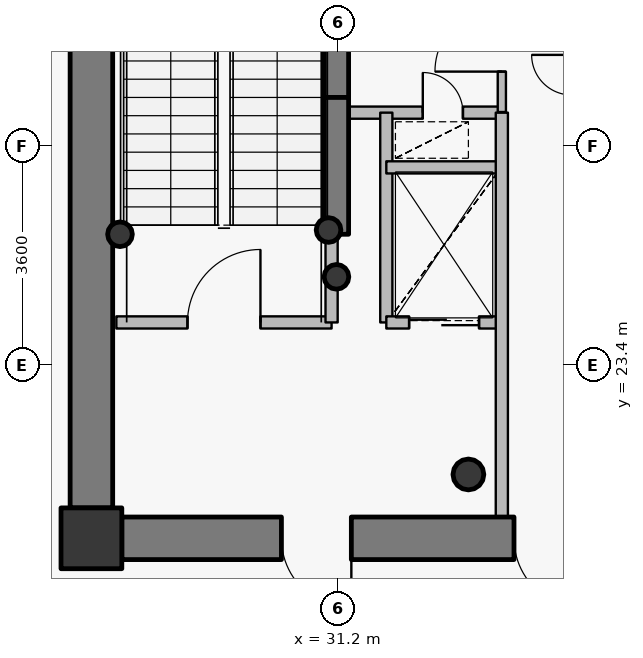
"""IFC4 building model, lengths in metres.
Left out: names, types, materials, properties, quantities, classifications, styles, units other than length and angle.
Written with IfcOpenShell. Run it as: python <this file> out.ifc"""

import sys

from ifc_helpers import new_model, si_unit, direction, frame, frame_2d, origin, origin_2d, place, context, subcontext, project, spatial, rectangle, hollow_circle, extrude, source, transform, mapped, element, fill, save


model = new_model("IFC4")
c1 = context("Model", 3, precision=1e-05, world=origin(), true_north=direction((0.0, 1.0)))
c2 = subcontext(c1, "Body", "Model", "MODEL_VIEW")
j1 = project(units=[si_unit("LENGTHUNIT", "METRE"), si_unit("PLANEANGLEUNIT", "RADIAN")], contexts=[c1])
p1 = place(None, origin())
s1 = spatial("IfcSite", under=j1, at=p1, CompositionType="ELEMENT")
p2 = place(p1, origin())
s2 = spatial("IfcBuilding", under=s1, at=p2, CompositionType="ELEMENT")
p3 = place(p2, frame((0.0, 0.0, 284.25)))
s3 = spatial("IfcBuildingStorey", under=s2, at=p3, CompositionType="ELEMENT", Elevation=284.25)
p4 = place(p3, frame((27.15, 20.55, 0.0), z_axis=(0.0, 0.0, 1.0), x_axis=(1.0, 0.0, 0.0)))
e1 = element("IfcColumn", 1, at=p4, inside=s3, PredefinedType="COLUMN", context=c2, shape_type="SweptSolid", body=[
    extrude(rectangle(XDim=1.0, YDim=1.0, at=origin_2d()), origin(), (0.0, 0.0, 1.0), 3.75),
])
p5 = place(p3, frame((33.35, 21.6, 0.0), z_axis=(0.0, 0.0, 1.0), x_axis=(1.0, 0.0, 0.0)))
e2 = element("IfcColumn", 2, at=p5, inside=s3, PredefinedType="COLUMN", context=c2, shape_type="SweptSolid", body=[
    extrude(hollow_circle(Radius=0.254, WallThickness=0.02, at=origin_2d()), origin(), (0.0, 0.0, 1.0), 3.75),
])
p6 = place(p3, frame((31.18, 27.8, 0.0), z_axis=(0.0, 0.0, 1.0), x_axis=(0.0, 1.0, 0.0)))
e3 = element("IfcWall", 3, at=p6, inside=s3, PredefinedType="SHEAR", context=c2, shape_type="SweptSolid", body=[
    extrude(rectangle(XDim=4.75, YDim=0.4, at=frame_2d((2.375, 0.0))), origin(), (0.0, 0.0, 1.0), 3.75),
])
for number, where, z_axis, x_axis in (
    (4, (31.05, 25.62, 0.0), (0.0, 0.0, 1.0), (1.0, 0.0, 0.0)),
    (5, (31.18, 24.85, 0.0), (0.0, 0.0, 1.0), (1.0, 0.0, 0.0)),
    (6, (27.62, 25.55, 0.0), (0.0, 0.0, 1.0), (1.0, 0.0, 0.0)),
):
    element("IfcColumn", number, at=place(p3, frame(where, z_axis=z_axis, x_axis=x_axis)), inside=s3, PredefinedType="COLUMN", context=c2, shape_type="SweptSolid", body=[
        extrude(hollow_circle(Radius=0.203, WallThickness=0.016, at=origin_2d()), origin(), (0.0, 0.0, 1.0), 3.75),
    ])
p7 = place(p3, frame((44.35, 20.55, 0.0), z_axis=(0.0, 0.0, 1.0), x_axis=(-1.0, 0.0, 0.0)))
e7 = element("IfcWall", 7, at=p7, inside=s3, PredefinedType="SHEAR", context=c2, shape_type="SweptSolid", body=[
    extrude(rectangle(XDim=16.7, YDim=0.7, at=frame_2d((8.35, 0.0))), origin(), (0.0, 0.0, 1.0), 3.05),
])
p8 = place(p7, frame((12.925, 0.0, 0.0)))
e8 = element("IfcOpeningElement", 8, at=p8, cuts=e7, PredefinedType="OPENING", context=c2, shape_type="SweptSolid", body=[
    extrude(rectangle(XDim=1.15, YDim=2.15, at=origin_2d()), frame((0.575, 0.36, 1.075), z_axis=(0.0, -1.0, 0.0), x_axis=(1.0, 0.0, 0.0)), (0.0, 0.0, 1.0), 0.72),
])
p9 = place(p7, frame((9.1, 0.0, 0.0)))
e9 = element("IfcOpeningElement", 9, at=p9, cuts=e7, PredefinedType="OPENING", context=c2, shape_type="SweptSolid", body=[
    extrude(rectangle(XDim=1.15, YDim=2.15, at=origin_2d()), frame((0.575, 0.36, 1.075), z_axis=(0.0, -1.0, 0.0), x_axis=(1.0, 0.0, 0.0)), (0.0, 0.0, 1.0), 0.72),
])
p10 = place(p3, frame((27.15, 21.05, 0.0), z_axis=(0.0, 0.0, 1.0), x_axis=(0.0, 1.0, 0.0)))
e10 = element("IfcWall", 10, at=p10, inside=s3, PredefinedType="SHEAR", context=c2, shape_type="SweptSolid", body=[
    extrude(rectangle(XDim=11.9, YDim=0.7, at=frame_2d((5.95, 0.0))), origin(), (0.0, 0.0, 1.0), 3.05),
])
p11 = place(p3, frame((31.18, 25.55, 0.0), z_axis=(0.0, 0.0, 1.0), x_axis=(0.0, 1.0, 0.0)))
e11 = element("IfcWall", 11, at=p11, inside=s3, PredefinedType="SHEAR", context=c2, shape_type="SweptSolid", body=[
    extrude(rectangle(XDim=2.25, YDim=0.4, at=frame_2d((1.125, 0.0))), origin(), (0.0, 0.0, 1.0), 3.1),
])
p12 = place(p3, frame((27.56, 24.1, 0.0), z_axis=(0.0, 0.0, 1.0), x_axis=(1.0, 0.0, 0.0)))
e12 = element("IfcWall", 12, at=p12, inside=s3, PredefinedType="PARTITIONING", context=c2, shape_type="SweptSolid", body=[
    extrude(rectangle(XDim=3.54, YDim=0.2, at=frame_2d((1.77, 0.0))), origin(), (0.0, 0.0, 1.0), 3.5),
])
p13 = place(p12, frame((1.17, 0.0, 0.0)))
e13 = element("IfcOpeningElement", 13, at=p13, cuts=e12, PredefinedType="OPENING", context=c2, shape_type="SweptSolid", body=[
    extrude(rectangle(XDim=1.2, YDim=2.15, at=origin_2d()), frame((0.6, 0.11, 1.075), z_axis=(0.0, -1.0, 0.0), x_axis=(1.0, 0.0, 0.0)), (0.0, 0.0, 1.0), 0.22),
])
p14 = place(p3, frame((31.1, 24.1, 0.0), z_axis=(0.0, 0.0, 1.0), x_axis=(0.0, 1.0, 0.0)))
e14 = element("IfcWall", 14, at=p14, inside=s3, PredefinedType="PARTITIONING", context=c2, shape_type="SweptSolid", body=[
    extrude(rectangle(XDim=1.44, YDim=0.2, at=frame_2d((0.72, 0.0))), origin(), (0.0, 0.0, 1.0), 3.5),
])
p15 = place(p3, frame((31.1, 27.55, 0.0), z_axis=(0.0, 0.0, 1.0), x_axis=(1.0, 0.0, 0.0)))
e15 = element("IfcWall", 15, at=p15, inside=s3, PredefinedType="PARTITIONING", context=c2, shape_type="SweptSolid", body=[
    extrude(rectangle(XDim=2.8, YDim=0.2, at=frame_2d((1.4, 0.0))), origin(), (0.0, 0.0, 1.0), 3.085),
])
p16 = place(p15, frame((1.5, 0.0, 0.0)))
e16 = element("IfcOpeningElement", 16, at=p16, cuts=e15, PredefinedType="OPENING", context=c2, shape_type="SweptSolid", body=[
    extrude(rectangle(XDim=0.66, YDim=2.05, at=origin_2d()), frame((0.33, 0.11, 1.025), z_axis=(0.0, -1.0, 0.0), x_axis=(1.0, 0.0, 0.0)), (0.0, 0.0, 1.0), 0.22),
])
p17 = place(p3, frame((32.0, 24.1, 0.0), z_axis=(0.0, 0.0, 1.0), x_axis=(0.0, 1.0, 0.0)))
e17 = element("IfcWall", 17, at=p17, inside=s3, PredefinedType="PARTITIONING", context=c2, shape_type="SweptSolid", body=[
    extrude(rectangle(XDim=3.45, YDim=0.2, at=frame_2d((1.725, 0.0))), origin(), (0.0, 0.0, 1.0), 3.5),
])
p18 = place(p3, frame((32.0, 24.1, 0.0), z_axis=(0.0, 0.0, 1.0), x_axis=(1.0, 0.0, 0.0)))
e18 = element("IfcWall", 18, at=p18, inside=s3, PredefinedType="PARTITIONING", context=c2, shape_type="SweptSolid", body=[
    extrude(rectangle(XDim=1.9, YDim=0.2, at=frame_2d((0.95, 0.0))), origin(), (0.0, 0.0, 1.0), 3.085),
])
p19 = place(p18, frame((0.375, 0.0, 0.0)))
e19 = element("IfcOpeningElement", 19, at=p19, cuts=e18, PredefinedType="OPENING", context=c2, shape_type="SweptSolid", body=[
    extrude(rectangle(XDim=1.15, YDim=2.15, at=origin_2d()), frame((0.575, 0.11, 1.075), z_axis=(0.0, -1.0, 0.0), x_axis=(1.0, 0.0, 0.0)), (0.0, 0.0, 1.0), 0.22),
])
p20 = place(p3, frame((32.0, 26.65, 0.0), z_axis=(0.0, 0.0, 1.0), x_axis=(1.0, 0.0, 0.0)))
e20 = element("IfcWall", 20, at=p20, inside=s3, PredefinedType="PARTITIONING", context=c2, shape_type="SweptSolid", body=[
    extrude(rectangle(XDim=1.9, YDim=0.2, at=frame_2d((0.95, 0.0))), origin(), (0.0, 0.0, 1.0), 3.085),
])
p21 = place(p3, frame((33.9, 20.9, 0.0), z_axis=(0.0, 0.0, 1.0), x_axis=(0.0, 1.0, 0.0)))
e21 = element("IfcWall", 21, at=p21, inside=s3, PredefinedType="PARTITIONING", context=c2, shape_type="SweptSolid", body=[
    extrude(rectangle(XDim=6.65, YDim=0.2, at=frame_2d((3.325, 0.0))), origin(), (0.0, 0.0, 1.0), 3.085),
])
p22 = place(p3, frame((33.9, 27.56, 0.0), z_axis=(0.0, 0.0, 1.0), x_axis=(0.0, 1.0, 0.0)))
e22 = element("IfcWall", 22, at=p22, inside=s3, PredefinedType="PARTITIONING", context=c2, shape_type="SweptSolid", body=[
    extrude(rectangle(XDim=5.54, YDim=0.135, at=frame_2d((2.77, 0.0))), origin(), (0.0, 0.0, 1.0), 3.085),
])
p23 = place(p22, frame((0.665, 0.0, 0.0)))
e23 = element("IfcOpeningElement", 23, at=p23, cuts=e22, PredefinedType="OPENING", context=c2, shape_type="SweptSolid", body=[
    extrude(rectangle(XDim=1.1, YDim=2.15, at=origin_2d()), frame((0.55, 0.078, 1.075), z_axis=(0.0, -1.0, 0.0), x_axis=(1.0, 0.0, 0.0)), (0.0, 0.0, 1.0), 0.155),
])
p24 = place(p22, frame((3.117, 0.0, 0.0)))
e24 = element("IfcOpeningElement", 24, at=p24, cuts=e22, PredefinedType="OPENING", context=c2, shape_type="SweptSolid", body=[
    extrude(rectangle(XDim=1.1, YDim=2.15, at=origin_2d()), frame((0.55, 0.078, 1.075), z_axis=(0.0, -1.0, 0.0), x_axis=(1.0, 0.0, 0.0)), (0.0, 0.0, 1.0), 0.155),
])
p25 = place(p3, frame((26.8, 21.04, 0.0), z_axis=(0.0, 0.0, 1.0), x_axis=(0.0, -1.0, 0.0)))
e25 = element("IfcWall", 25, at=p25, inside=s3, PredefinedType="PARTITIONING", context=c2, shape_type="SweptSolid", body=[
    extrude(rectangle(XDim=0.84, YDim=0.135, at=frame_2d((0.42, 0.0))), origin(), (0.0, 0.0, 1.0), 3.035),
])
p26 = place(p3, frame((27.107, 20.2, 0.0), z_axis=(0.0, 0.0, 1.0), x_axis=(1.0, 0.0, 0.0)))
e26 = element("IfcWall", 26, at=p26, inside=s3, PredefinedType="PARTITIONING", context=c2, shape_type="SweptSolid", body=[
    extrude(rectangle(XDim=0.532, YDim=0.135, at=frame_2d((0.266, 0.0))), origin(), (0.0, 0.0, 1.0), 3.035),
])
m1 = source(origin(), c2, "Body", "SweptSolid", [
    extrude(rectangle(XDim=1.15, YDim=2.15, at=origin_2d()), frame((0.575, 0.025, 1.075), z_axis=(0.0, -1.0, 0.0), x_axis=(1.0, 0.0, 0.0)), (0.0, 0.0, 1.0), 0.05),
])
p27 = place(p8, origin())
e27 = element("IfcDoor", 27, at=p27, inside=s3, OperationType="SINGLE_SWING_LEFT", PredefinedType="DOOR", context=c2, shape_type="MappedRepresentation", body=[
    mapped(m1, transform((0.0, 0.0, 0.0), x_axis=(1.0, 0.0, 0.0), y_axis=(0.0, 1.0, 0.0), z_axis=(0.0, 0.0, 1.0), scale=1.0)),
])
fill(e8, e27)
p28 = place(p9, origin())
e28 = element("IfcDoor", 28, at=p28, inside=s3, OperationType="SINGLE_SWING_LEFT", PredefinedType="DOOR", context=c2, shape_type="MappedRepresentation", body=[
    mapped(m1, transform((0.0, 0.0, 0.0), x_axis=(1.0, 0.0, 0.0), y_axis=(0.0, 1.0, 0.0), z_axis=(0.0, 0.0, 1.0), scale=1.0)),
])
fill(e9, e28)
m2 = source(origin(), c2, "Body", "SweptSolid", [
    extrude(rectangle(XDim=1.2, YDim=2.15, at=origin_2d()), frame((0.6, 0.025, 1.075), z_axis=(0.0, -1.0, 0.0), x_axis=(1.0, 0.0, 0.0)), (0.0, 0.0, 1.0), 0.05),
])
p29 = place(p13, origin())
e29 = element("IfcDoor", 29, at=p29, inside=s3, OperationType="SINGLE_SWING_RIGHT", PredefinedType="DOOR", context=c2, shape_type="MappedRepresentation", body=[
    mapped(m2, transform((0.0, 0.0, 0.0), x_axis=(1.0, 0.0, 0.0), y_axis=(0.0, 1.0, 0.0), z_axis=(0.0, 0.0, 1.0), scale=1.0)),
])
fill(e13, e29)
m3 = source(origin(), c2, "Body", "SweptSolid", [
    extrude(rectangle(XDim=1.15, YDim=2.15, at=origin_2d()), frame((0.575, 0.025, 1.075), z_axis=(0.0, -1.0, 0.0), x_axis=(1.0, 0.0, 0.0)), (0.0, 0.0, 1.0), 0.05),
])
p30 = place(p19, origin())
e30 = element("IfcDoor", 30, at=p30, inside=s3, OperationType="DOUBLE_DOOR_SLIDING", PredefinedType="USERDEFINED", context=c2, shape_type="MappedRepresentation", body=[
    mapped(m3, transform((0.0, 0.0, 0.0), x_axis=(1.0, 0.0, 0.0), y_axis=(0.0, 1.0, 0.0), z_axis=(0.0, 0.0, 1.0), scale=1.0)),
])
fill(e19, e30)
m4 = source(origin(), c2, "Body", "SweptSolid", [
    extrude(rectangle(XDim=1.1, YDim=2.15, at=origin_2d()), frame((0.55, 0.025, 1.075), z_axis=(0.0, -1.0, 0.0), x_axis=(1.0, 0.0, 0.0)), (0.0, 0.0, 1.0), 0.05),
])
p31 = place(p23, origin())
e31 = element("IfcDoor", 31, at=p31, inside=s3, OperationType="SINGLE_SWING_LEFT", PredefinedType="DOOR", context=c2, shape_type="MappedRepresentation", body=[
    mapped(m4, transform((0.0, 0.0, 0.0), x_axis=(1.0, 0.0, 0.0), y_axis=(0.0, 1.0, 0.0), z_axis=(0.0, 0.0, 1.0), scale=1.0)),
])
fill(e23, e31)
m5 = source(origin(), c2, "Body", "SweptSolid", [
    extrude(rectangle(XDim=0.66, YDim=2.05, at=origin_2d()), frame((0.33, 0.025, 1.025), z_axis=(0.0, -1.0, 0.0), x_axis=(1.0, 0.0, 0.0)), (0.0, 0.0, 1.0), 0.05),
])
p32 = place(p16, origin())
e32 = element("IfcDoor", 32, at=p32, inside=s3, OperationType="SINGLE_SWING_LEFT", PredefinedType="USERDEFINED", context=c2, shape_type="MappedRepresentation", body=[
    mapped(m5, transform((0.0, 0.0, 0.0), x_axis=(1.0, 0.0, 0.0), y_axis=(0.0, 1.0, 0.0), z_axis=(0.0, 0.0, 1.0), scale=1.0)),
])
fill(e16, e32)
save(model, sys.argv[1])
